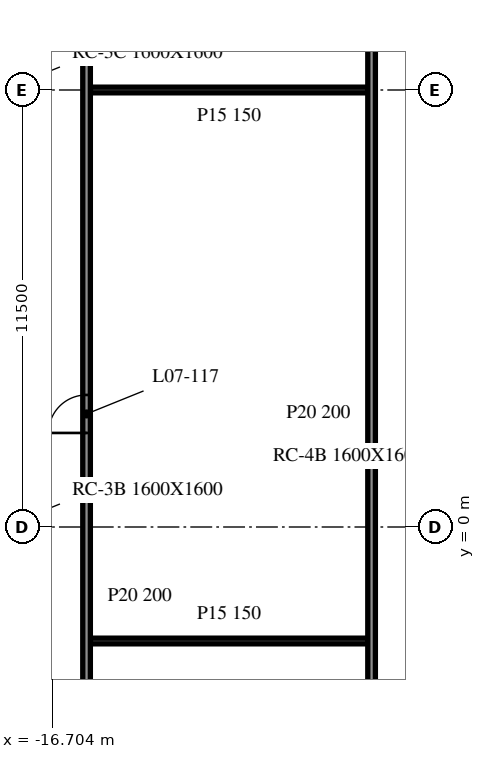
"""IFC4 building model, lengths in metres.
Left out: names, types, materials, properties, quantities, classifications, styles, units other than length and angle.
Written with IfcOpenShell. Run it as: python <this file> out.ifc"""

import sys

from ifc_helpers import new_model, si_unit, direction, frame, frame_2d, origin, place, context, subcontext, project, spatial, rectangle, extrude, element, fill, save


model = new_model("IFC4")
c1 = context("Model", 3, precision=1e-05, world=origin(), true_north=direction((0.0, 1.0)))
c2 = subcontext(c1, "Body", "Model", "MODEL_VIEW")
j1 = project(units=[si_unit("LENGTHUNIT", "METRE"), si_unit("PLANEANGLEUNIT", "RADIAN")], contexts=[c1])
p1 = place(None, origin())
s1 = spatial("IfcSite", under=j1, at=p1, CompositionType="ELEMENT")
p2 = place(p1, origin())
s2 = spatial("IfcBuilding", under=s1, at=p2, CompositionType="ELEMENT")
p3 = place(p2, frame((0.0, 0.0, 33.0)))
s3 = spatial("IfcBuildingStorey", under=s2, at=p3, CompositionType="ELEMENT", Elevation=33.0)
for number, where, z_axis, x_axis in (
    (1, (-15.7, -3.0, 0.0), (0.0, 0.0, 1.0), (1.0, 0.0, 0.0)),
    (2, (-15.7, 11.5, 0.0), (0.0, 0.0, 1.0), (1.0, 0.0, 0.0)),
):
    element("IfcWall", number, at=place(p3, frame(where, z_axis=z_axis, x_axis=x_axis)), inside=s3, PredefinedType="PARTITIONING", context=c2, shape_type="SweptSolid", body=[
        extrude(rectangle(XDim=7.3, YDim=0.15, at=frame_2d((3.65, 0.0))), origin(), (0.0, 0.0, 1.0), 3.96),
    ])
p4 = place(p3, frame((-15.8, -9.025, 0.0), z_axis=(0.0, 0.0, 1.0), x_axis=(0.0, 1.0, 0.0)))
e3 = element("IfcWall", 3, at=p4, inside=s3, PredefinedType="PARTITIONING", context=c2, shape_type="SweptSolid", body=[
    extrude(rectangle(XDim=24.05, YDim=0.2, at=frame_2d((12.025, 0.0))), origin(), (0.0, 0.0, 1.0), 3.96),
])
p5 = place(p4, frame((11.5, 0.0, 0.0)))
e4 = element("IfcOpeningElement", 4, at=p5, cuts=e3, PredefinedType="OPENING", context=c2, shape_type="SweptSolid", body=[
    extrude(rectangle(XDim=1.0, YDim=2.1, at=frame_2d((0.5, 1.05))), frame((0.0, 0.11, 0.0), z_axis=(0.0, -1.0, 0.0), x_axis=(1.0, 0.0, 0.0)), (0.0, 0.0, 1.0), 0.22),
])
p6 = place(p3, frame((-8.3, -9.025, 0.0), z_axis=(0.0, 0.0, 1.0), x_axis=(0.0, 1.0, 0.0)))
e5 = element("IfcWall", 5, at=p6, inside=s3, PredefinedType="PARTITIONING", context=c2, shape_type="SweptSolid", body=[
    extrude(rectangle(XDim=24.05, YDim=0.2, at=frame_2d((12.025, 0.0))), origin(), (0.0, 0.0, 1.0), 3.96),
])
p7 = place(p5, origin())
e6 = element("IfcDoor", 6, at=p7, inside=s3, OperationType="SINGLE_SWING_RIGHT", PredefinedType="DOOR", context=c2, shape_type="SweptSolid", body=[
    extrude(rectangle(XDim=1.0, YDim=2.1, at=frame_2d((0.5, 1.05))), frame((0.0, 0.025, 0.0), z_axis=(0.0, -1.0, 0.0), x_axis=(1.0, 0.0, 0.0)), (0.0, 0.0, 1.0), 0.05),
])
fill(e4, e6)
save(model, sys.argv[1])
